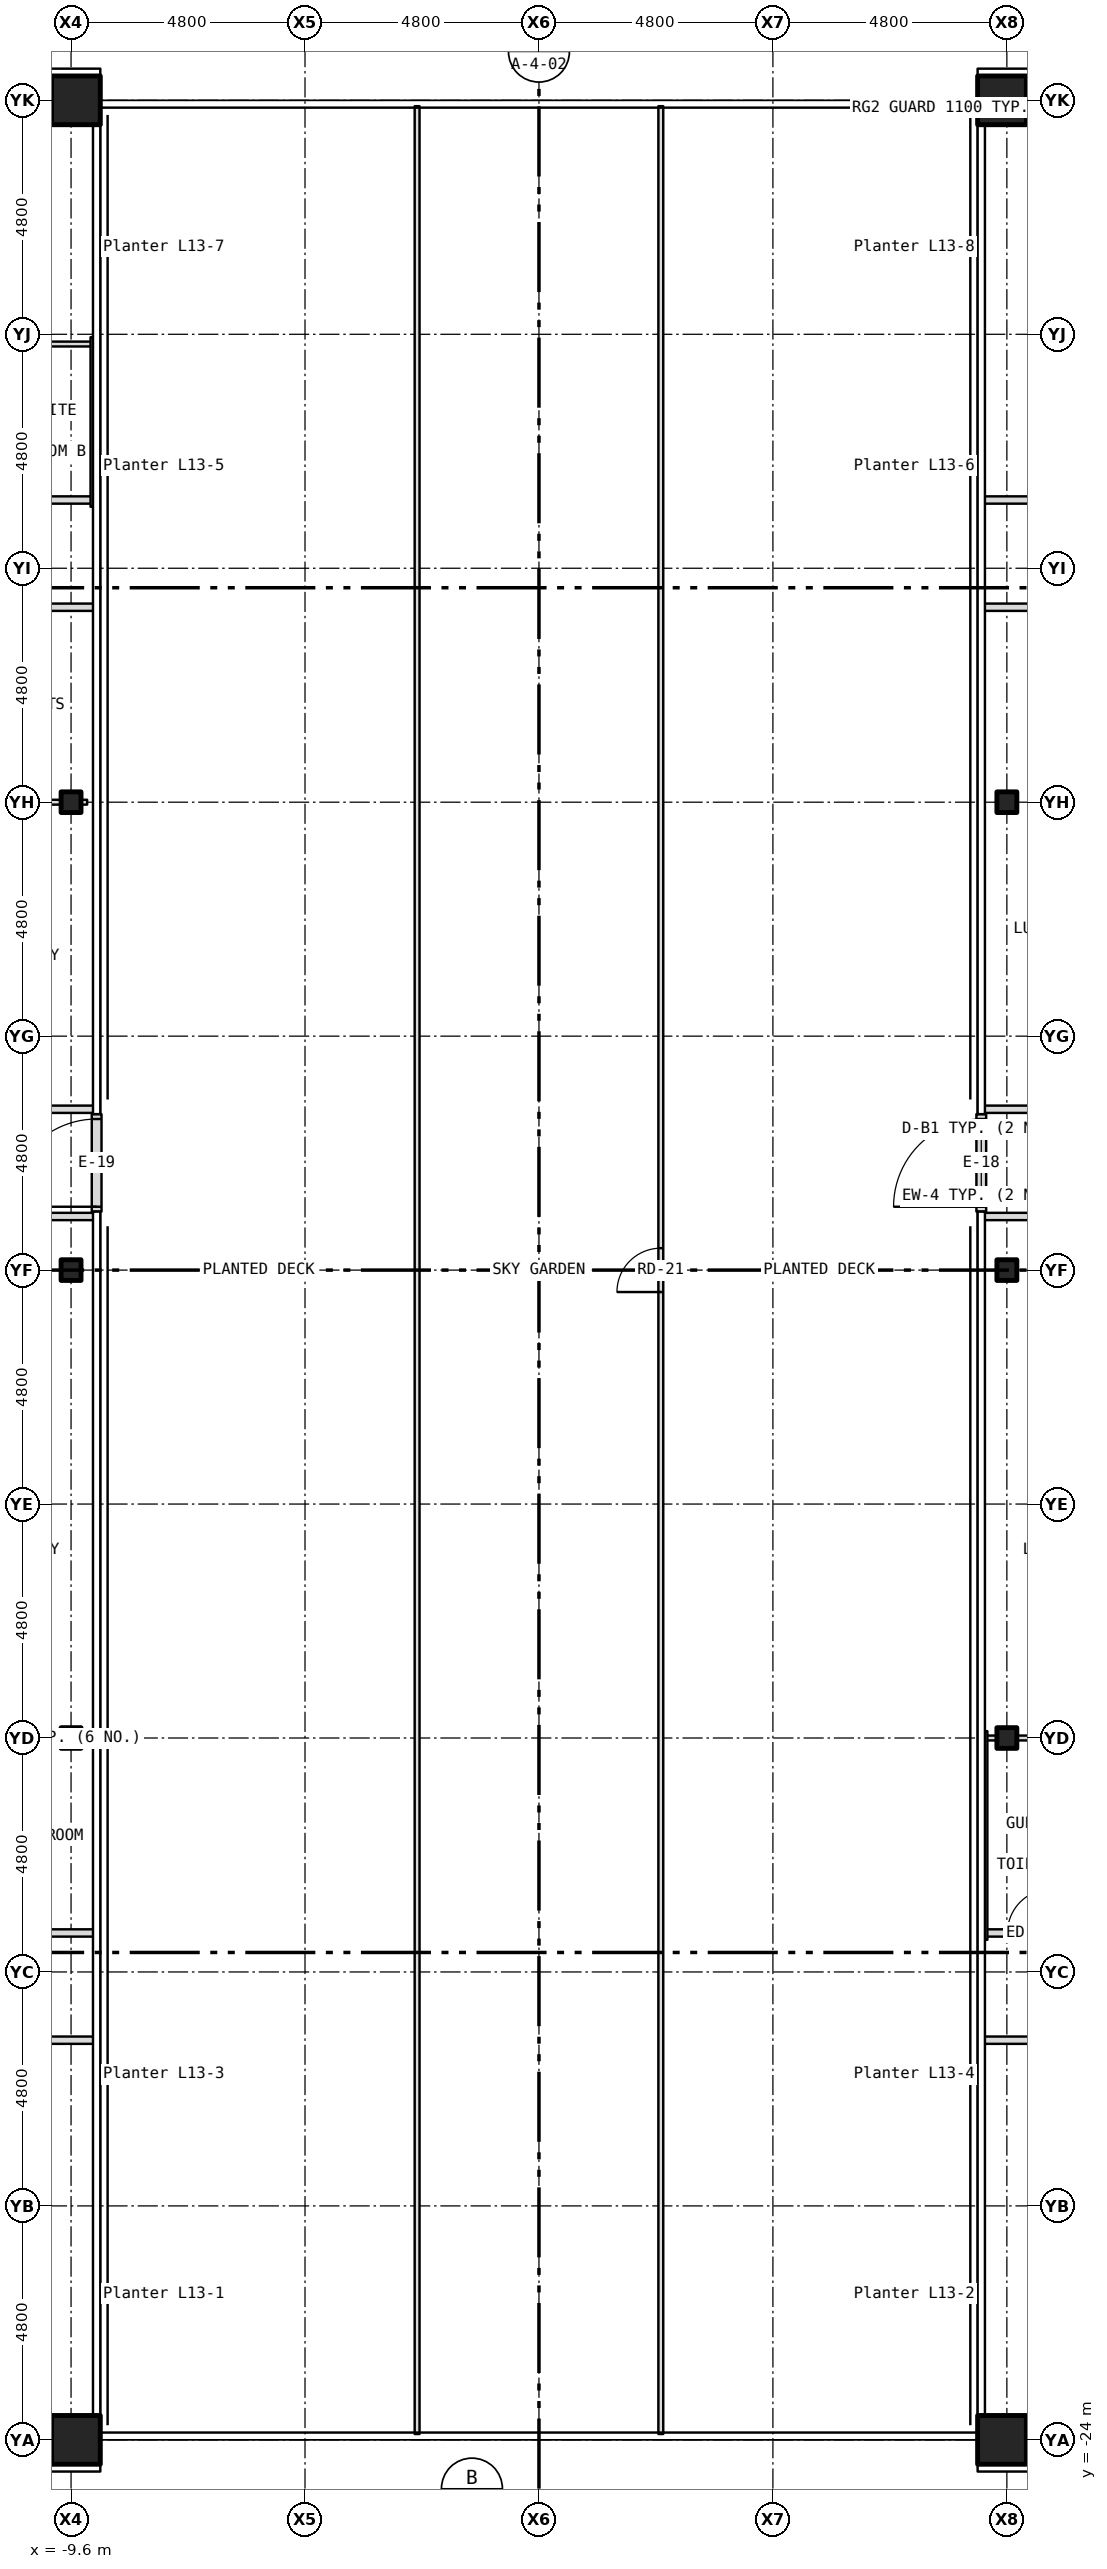
"""IFC4 building model, lengths in metres.
Left out: names, types, materials, properties, quantities, classifications, styles, units other than length and angle.
Written with IfcOpenShell. Run it as: python <this file> out.ifc"""

import sys

from ifc_helpers import new_model, si_unit, direction, frame, frame_2d, origin, origin_2d, place, context, subcontext, project, spatial, rectangle, hollow_rectangle, i_section, extrude, element, fill, save


model = new_model("IFC4")
c1 = context("Model", 3, precision=1e-05, world=origin(), true_north=direction((0.0, 1.0)))
c2 = subcontext(c1, "Body", "Model", "MODEL_VIEW")
j1 = project(units=[si_unit("LENGTHUNIT", "METRE"), si_unit("PLANEANGLEUNIT", "RADIAN")], contexts=[c1])
p1 = place(None, origin())
s1 = spatial("IfcSite", under=j1, at=p1, CompositionType="ELEMENT")
p2 = place(p1, origin())
s2 = spatial("IfcBuilding", under=s1, at=p2, CompositionType="ELEMENT")
p3 = place(p2, frame((0.0, 0.0, 60.0)))
s3 = spatial("IfcBuildingStorey", under=s2, at=p3, CompositionType="ELEMENT", Elevation=60.0)
for number, where, z_axis, x_axis in (
    (1, (-9.5, 24.0, -0.15), (0.0, 0.0, 1.0), (1.0, 0.0, 0.0)),
    (2, (-9.5, -24.0, -0.15), (0.0, 0.0, 1.0), (1.0, 0.0, 0.0)),
    (3, (9.5, 24.0, -0.15), (0.0, 0.0, 1.0), (1.0, 0.0, 0.0)),
    (4, (9.5, -24.0, -0.15), (0.0, 0.0, 1.0), (1.0, 0.0, 0.0)),
):
    element("IfcColumn", number, at=place(p3, frame(where, z_axis=z_axis, x_axis=x_axis)), inside=s3, PredefinedType="COLUMN", context=c2, shape_type="SweptSolid", body=[
        extrude(hollow_rectangle(XDim=1.0, YDim=1.0, WallThickness=0.06, at=origin_2d()), origin(), (0.0, 0.0, 1.0), 3.5),
    ])
for number, where, z_axis, x_axis in (
    (5, (-9.6, -9.6, -0.15), (0.0, 0.0, 1.0), (1.0, 0.0, 0.0)),
    (6, (-9.6, 0.0, -0.15), (0.0, 0.0, 1.0), (1.0, 0.0, 0.0)),
    (7, (-9.6, 9.6, -0.15), (0.0, 0.0, 1.0), (1.0, 0.0, 0.0)),
    (8, (9.6, -9.6, -0.15), (0.0, 0.0, 1.0), (1.0, 0.0, 0.0)),
    (9, (9.6, 0.0, -0.15), (0.0, 0.0, 1.0), (1.0, 0.0, 0.0)),
    (10, (9.6, 9.6, -0.15), (0.0, 0.0, 1.0), (1.0, 0.0, 0.0)),
):
    element("IfcColumn", number, at=place(p3, frame(where, z_axis=z_axis, x_axis=x_axis)), inside=s3, PredefinedType="COLUMN", context=c2, shape_type="SweptSolid", body=[
        extrude(i_section(OverallWidth=0.409, OverallDepth=0.424, WebThickness=0.033, FlangeThickness=0.052, at=origin_2d()), origin(), (0.0, 0.0, 1.0), 3.5),
    ])
p4 = place(p3, frame((9.075, 1.2, 0.0), z_axis=(0.0, 0.0, 1.0), x_axis=(0.0, 1.0, 0.0)))
e11 = element("IfcWall", 11, at=p4, inside=s3, PredefinedType="SOLIDWALL", context=c2, shape_type="SweptSolid", body=[
    extrude(rectangle(XDim=2.0, YDim=0.2, at=frame_2d((1.0, 0.0))), origin(), (0.0, 0.0, 1.0), 2.593),
])
p5 = place(p4, frame((0.1, 0.0, 0.0)))
e12 = element("IfcOpeningElement", 12, at=p5, cuts=e11, PredefinedType="OPENING", context=c2, shape_type="SweptSolid", body=[
    extrude(rectangle(XDim=1.8, YDim=2.1, at=frame_2d((0.9, 1.05))), frame((0.0, 0.112, 0.0), z_axis=(0.0, -1.0, 0.0), x_axis=(1.0, 0.0, 0.0)), (0.0, 0.0, 1.0), 0.224),
])
p6 = place(p3, frame((-9.075, 1.2, 0.0), z_axis=(0.0, 0.0, 1.0), x_axis=(0.0, 1.0, 0.0)))
e13 = element("IfcWall", 13, at=p6, inside=s3, PredefinedType="SOLIDWALL", context=c2, shape_type="SweptSolid", body=[
    extrude(rectangle(XDim=2.0, YDim=0.2, at=frame_2d((1.0, 0.0))), origin(), (0.0, 0.0, 1.0), 2.593),
])
p7 = place(p6, frame((0.1, 0.0, 0.0)))
e14 = element("IfcOpeningElement", 14, at=p7, cuts=e13, PredefinedType="OPENING", context=c2, shape_type="SweptSolid", body=[
    extrude(rectangle(XDim=1.8, YDim=2.1, at=frame_2d((0.9, 1.05))), frame((0.0, 0.112, 0.0), z_axis=(0.0, -1.0, 0.0), x_axis=(1.0, 0.0, 0.0)), (0.0, 0.0, 1.0), 0.224),
])
p8 = place(p3, frame((-15.8, -15.8, 0.0), z_axis=(0.0, 0.0, 1.0), x_axis=(1.0, 0.0, 0.0)))
e15 = element("IfcWall", 15, at=p8, inside=s3, PredefinedType="PARTITIONING", context=c2, shape_type="SweptSolid", body=[
    extrude(rectangle(XDim=6.68, YDim=0.15, at=frame_2d((3.34, 0.0))), origin(), (0.0, 0.0, 1.0), 3.35),
])
p9 = place(p8, frame((4.047, 0.0, 0.0)))
e16 = element("IfcOpeningElement", 16, at=p9, cuts=e15, PredefinedType="OPENING", context=c2, shape_type="SweptSolid", body=[
    extrude(rectangle(XDim=1.0, YDim=2.1, at=frame_2d((0.5, 1.05))), frame((0.0, 0.087, 0.0), z_axis=(0.0, -1.0, 0.0), x_axis=(1.0, 0.0, 0.0)), (0.0, 0.0, 1.0), 0.174),
])
p10 = place(p3, frame((9.12, -15.8, 0.0), z_axis=(0.0, 0.0, 1.0), x_axis=(1.0, 0.0, 0.0)))
e17 = element("IfcWall", 17, at=p10, inside=s3, PredefinedType="PARTITIONING", context=c2, shape_type="SweptSolid", body=[
    extrude(rectangle(XDim=6.68, YDim=0.15, at=frame_2d((3.34, 0.0))), origin(), (0.0, 0.0, 1.0), 3.35),
])
p11 = place(p10, frame((1.633, 0.0, 0.0)))
e18 = element("IfcOpeningElement", 18, at=p11, cuts=e17, PredefinedType="OPENING", context=c2, shape_type="SweptSolid", body=[
    extrude(rectangle(XDim=1.0, YDim=2.1, at=frame_2d((0.5, 1.05))), frame((0.0, 0.087, 0.0), z_axis=(0.0, -1.0, 0.0), x_axis=(1.0, 0.0, 0.0)), (0.0, 0.0, 1.0), 0.174),
])
p12 = place(p3, frame((-12.8, -13.6, 0.0), z_axis=(0.0, 0.0, 1.0), x_axis=(1.0, 0.0, 0.0)))
e19 = element("IfcWall", 19, at=p12, inside=s3, PredefinedType="PARTITIONING", context=c2, shape_type="SweptSolid", body=[
    extrude(rectangle(XDim=3.68, YDim=0.15, at=frame_2d((1.84, 0.0))), origin(), (0.0, 0.0, 1.0), 3.35),
])
p13 = place(p12, frame((1.375, 0.0, 0.0)))
e20 = element("IfcOpeningElement", 20, at=p13, cuts=e19, PredefinedType="OPENING", context=c2, shape_type="SweptSolid", body=[
    extrude(rectangle(XDim=0.9, YDim=2.1, at=frame_2d((0.45, 1.05))), frame((0.0, 0.087, 0.0), z_axis=(0.0, -1.0, 0.0), x_axis=(1.0, 0.0, 0.0)), (0.0, 0.0, 1.0), 0.174),
])
p14 = place(p3, frame((9.15, -13.6, 0.0), z_axis=(0.0, 0.0, 1.0), x_axis=(1.0, 0.0, 0.0)))
e21 = element("IfcWall", 21, at=p14, inside=s3, PredefinedType="PARTITIONING", context=c2, shape_type="SweptSolid", body=[
    extrude(rectangle(XDim=3.65, YDim=0.15, at=frame_2d((1.825, 0.0))), origin(), (0.0, 0.0, 1.0), 3.35),
])
p15 = place(p14, frame((0.462, 0.0, 0.0)))
e22 = element("IfcOpeningElement", 22, at=p15, cuts=e21, PredefinedType="OPENING", context=c2, shape_type="SweptSolid", body=[
    extrude(rectangle(XDim=0.9, YDim=2.1, at=frame_2d((0.45, 1.05))), frame((0.0, 0.087, 0.0), z_axis=(0.0, -1.0, 0.0), x_axis=(1.0, 0.0, 0.0)), (0.0, 0.0, 1.0), 0.174),
])
p16 = place(p3, frame((-12.8, -9.6, 0.0), z_axis=(0.0, 0.0, 1.0), x_axis=(1.0, 0.0, 0.0)))
e23 = element("IfcWall", 23, at=p16, inside=s3, PredefinedType="PARTITIONING", context=c2, shape_type="SweptSolid", body=[
    extrude(rectangle(XDim=2.996, YDim=0.1, at=frame_2d((1.498, 0.0))), origin(), (0.0, 0.0, 1.0), 2.728),
])
p17 = place(p3, frame((-9.804, -9.6, 0.0), z_axis=(0.0, 0.0, 1.0), x_axis=(1.0, 0.0, 0.0)))
e24 = element("IfcWall", 24, at=p17, inside=s3, PredefinedType="PARTITIONING", context=c2, shape_type="SweptSolid", body=[
    extrude(rectangle(XDim=0.534, YDim=0.1, at=frame_2d((0.267, 0.0))), origin(), (0.0, 0.0, 1.0), 3.35),
])
p18 = place(p3, frame((9.15, -9.6, 0.0), z_axis=(0.0, 0.0, 1.0), x_axis=(1.0, 0.0, 0.0)))
e25 = element("IfcWall", 25, at=p18, inside=s3, PredefinedType="PARTITIONING", context=c2, shape_type="SweptSolid", body=[
    extrude(rectangle(XDim=0.654, YDim=0.1, at=frame_2d((0.327, 0.0))), origin(), (0.0, 0.0, 1.0), 3.35),
])
p19 = place(p3, frame((9.804, -9.6, 0.0), z_axis=(0.0, 0.0, 1.0), x_axis=(1.0, 0.0, 0.0)))
e26 = element("IfcWall", 26, at=p19, inside=s3, PredefinedType="PARTITIONING", context=c2, shape_type="SweptSolid", body=[
    extrude(rectangle(XDim=2.996, YDim=0.1, at=frame_2d((1.498, 0.0))), origin(), (0.0, 0.0, 1.0), 2.728),
])
for number, where, z_axis, x_axis in (
    (27, (-12.4, 1.1, 0.0), (0.0, 0.0, 1.0), (1.0, 0.0, 0.0)),
    (28, (9.12, 1.1, 0.0), (0.0, 0.0, 1.0), (1.0, 0.0, 0.0)),
):
    element("IfcWall", number, at=place(p3, frame(where, z_axis=z_axis, x_axis=x_axis)), inside=s3, PredefinedType="PARTITIONING", context=c2, shape_type="SweptSolid", body=[
        extrude(rectangle(XDim=3.28, YDim=0.15, at=frame_2d((1.64, 0.0))), origin(), (0.0, 0.0, 1.0), 3.35),
    ])
for number, where, z_axis, x_axis in (
    (29, (-12.8, 3.3, 0.0), (0.0, 0.0, 1.0), (1.0, 0.0, 0.0)),
    (30, (9.12, 3.3, 0.0), (0.0, 0.0, 1.0), (1.0, 0.0, 0.0)),
):
    element("IfcWall", number, at=place(p3, frame(where, z_axis=z_axis, x_axis=x_axis)), inside=s3, PredefinedType="PARTITIONING", context=c2, shape_type="SweptSolid", body=[
        extrude(rectangle(XDim=3.68, YDim=0.15, at=frame_2d((1.84, 0.0))), origin(), (0.0, 0.0, 1.0), 3.35),
    ])
p20 = place(p3, frame((-12.8, 9.6, 0.0), z_axis=(0.0, 0.0, 1.0), x_axis=(1.0, 0.0, 0.0)))
e31 = element("IfcWall", 31, at=p20, inside=s3, PredefinedType="PARTITIONING", context=c2, shape_type="SweptSolid", body=[
    extrude(rectangle(XDim=2.996, YDim=0.1, at=frame_2d((1.498, 0.0))), origin(), (0.0, 0.0, 1.0), 2.728),
])
p21 = place(p3, frame((-9.804, 9.6, 0.0), z_axis=(0.0, 0.0, 1.0), x_axis=(1.0, 0.0, 0.0)))
e32 = element("IfcWall", 32, at=p21, inside=s3, PredefinedType="PARTITIONING", context=c2, shape_type="SweptSolid", body=[
    extrude(rectangle(XDim=0.534, YDim=0.1, at=frame_2d((0.267, 0.0))), origin(), (0.0, 0.0, 1.0), 3.35),
])
p22 = place(p3, frame((-12.8, 13.6, 0.0), z_axis=(0.0, 0.0, 1.0), x_axis=(1.0, 0.0, 0.0)))
e33 = element("IfcWall", 33, at=p22, inside=s3, PredefinedType="PARTITIONING", context=c2, shape_type="SweptSolid", body=[
    extrude(rectangle(XDim=3.68, YDim=0.15, at=frame_2d((1.84, 0.0))), origin(), (0.0, 0.0, 1.0), 3.35),
])
p23 = place(p22, frame((1.375, 0.0, 0.0)))
e34 = element("IfcOpeningElement", 34, at=p23, cuts=e33, PredefinedType="OPENING", context=c2, shape_type="SweptSolid", body=[
    extrude(rectangle(XDim=0.9, YDim=2.1, at=frame_2d((0.45, 1.05))), frame((0.0, 0.087, 0.0), z_axis=(0.0, -1.0, 0.0), x_axis=(1.0, 0.0, 0.0)), (0.0, 0.0, 1.0), 0.174),
])
p24 = place(p3, frame((9.12, 13.6, 0.0), z_axis=(0.0, 0.0, 1.0), x_axis=(1.0, 0.0, 0.0)))
e35 = element("IfcWall", 35, at=p24, inside=s3, PredefinedType="PARTITIONING", context=c2, shape_type="SweptSolid", body=[
    extrude(rectangle(XDim=3.68, YDim=0.15, at=frame_2d((1.84, 0.0))), origin(), (0.0, 0.0, 1.0), 3.35),
])
p25 = place(p3, frame((-15.8, 15.8, 0.0), z_axis=(0.0, 0.0, 1.0), x_axis=(1.0, 0.0, 0.0)))
e36 = element("IfcWall", 36, at=p25, inside=s3, PredefinedType="PARTITIONING", context=c2, shape_type="SweptSolid", body=[
    extrude(rectangle(XDim=6.65, YDim=0.15, at=frame_2d((3.325, 0.0))), origin(), (0.0, 0.0, 1.0), 3.35),
])
p26 = place(p25, frame((1.847, 0.0, 0.0)))
e37 = element("IfcOpeningElement", 37, at=p26, cuts=e36, PredefinedType="OPENING", context=c2, shape_type="SweptSolid", body=[
    extrude(rectangle(XDim=1.0, YDim=2.1, at=frame_2d((0.5, 1.05))), frame((0.0, 0.087, 0.0), z_axis=(0.0, -1.0, 0.0), x_axis=(1.0, 0.0, 0.0)), (0.0, 0.0, 1.0), 0.174),
])
p27 = place(p3, frame((9.12, 15.8, 0.0), z_axis=(0.0, 0.0, 1.0), x_axis=(1.0, 0.0, 0.0)))
e38 = element("IfcWall", 38, at=p27, inside=s3, PredefinedType="PARTITIONING", context=c2, shape_type="SweptSolid", body=[
    extrude(rectangle(XDim=6.68, YDim=0.15, at=frame_2d((3.34, 0.0))), origin(), (0.0, 0.0, 1.0), 3.35),
])
p28 = place(p27, frame((1.633, 0.0, 0.0)))
e39 = element("IfcOpeningElement", 39, at=p28, cuts=e38, PredefinedType="OPENING", context=c2, shape_type="SweptSolid", body=[
    extrude(rectangle(XDim=1.0, YDim=2.1, at=frame_2d((0.5, 1.05))), frame((0.0, 0.087, 0.0), z_axis=(0.0, -1.0, 0.0), x_axis=(1.0, 0.0, 0.0)), (0.0, 0.0, 1.0), 0.174),
])
p29 = place(p3, frame((-11.35, 19.0, 0.0), z_axis=(0.0, 0.0, 1.0), x_axis=(1.0, 0.0, 0.0)))
e40 = element("IfcWall", 40, at=p29, inside=s3, PredefinedType="PARTITIONING", context=c2, shape_type="SweptSolid", body=[
    extrude(rectangle(XDim=2.2, YDim=0.1, at=frame_2d((1.1, 0.0))), origin(), (0.0, 0.0, 1.0), 3.35),
])
p30 = place(p3, frame((-9.15, 15.66, 0.0), z_axis=(0.0, 0.0, 1.0), x_axis=(0.0, 1.0, 0.0)))
e41 = element("IfcWall", 41, at=p30, inside=s3, PredefinedType="PARTITIONING", context=c2, shape_type="SweptSolid", body=[
    extrude(rectangle(XDim=3.48, YDim=0.1, at=frame_2d((1.74, 0.0))), origin(), (0.0, 0.0, 1.0), 2.733),
])
p31 = place(p3, frame((-2.5, -23.88, 0.0), z_axis=(0.0, 0.0, 1.0), x_axis=(0.0, 1.0, 0.0)))
e42 = element("IfcWall", 42, at=p31, inside=s3, PredefinedType="PARTITIONING", context=c2, shape_type="SweptSolid", body=[
    extrude(rectangle(XDim=47.76, YDim=0.1, at=frame_2d((23.88, 0.0))), origin(), (0.0, 0.0, 1.0), 3.35),
])
p32 = place(p3, frame((2.5, -23.88, 0.0), z_axis=(0.0, 0.0, 1.0), x_axis=(0.0, 1.0, 0.0)))
e43 = element("IfcWall", 43, at=p32, inside=s3, PredefinedType="PARTITIONING", context=c2, shape_type="SweptSolid", body=[
    extrude(rectangle(XDim=47.76, YDim=0.1, at=frame_2d((23.88, 0.0))), origin(), (0.0, 0.0, 1.0), 3.35),
])
p33 = place(p32, frame((23.43, 0.0, 0.0)))
e44 = element("IfcOpeningElement", 44, at=p33, cuts=e43, PredefinedType="OPENING", context=c2, shape_type="SweptSolid", body=[
    extrude(rectangle(XDim=0.9, YDim=2.1, at=frame_2d((0.45, 1.05))), frame((0.0, 0.062, 0.0), z_axis=(0.0, -1.0, 0.0), x_axis=(1.0, 0.0, 0.0)), (0.0, 0.0, 1.0), 0.124),
])
p34 = place(p3, frame((9.15, -13.74, 0.0), z_axis=(0.0, 0.0, 1.0), x_axis=(0.0, 1.0, 0.0)))
e45 = element("IfcWall", 45, at=p34, inside=s3, PredefinedType="PARTITIONING", context=c2, shape_type="SweptSolid", body=[
    extrude(rectangle(XDim=4.28, YDim=0.1, at=frame_2d((2.14, 0.0))), origin(), (0.0, 0.0, 1.0), 2.733),
])
p35 = place(p5, origin())
e46 = element("IfcDoor", 46, at=p35, inside=s3, OperationType="DOUBLE_DOOR_DOUBLE_SWING", PredefinedType="DOOR", context=c2, shape_type="SweptSolid", body=[
    extrude(rectangle(XDim=1.8, YDim=2.1, at=frame_2d((0.9, 1.05))), frame((0.0, 0.025, 0.0), z_axis=(0.0, -1.0, 0.0), x_axis=(1.0, 0.0, 0.0)), (0.0, 0.0, 1.0), 0.05),
])
fill(e12, e46)
p36 = place(p7, origin())
e47 = element("IfcDoor", 47, at=p36, inside=s3, OperationType="DOUBLE_DOOR_DOUBLE_SWING", PredefinedType="DOOR", context=c2, shape_type="SweptSolid", body=[
    extrude(rectangle(XDim=1.8, YDim=2.1, at=frame_2d((0.9, 1.05))), frame((0.0, 0.025, 0.0), z_axis=(0.0, -1.0, 0.0), x_axis=(1.0, 0.0, 0.0)), (0.0, 0.0, 1.0), 0.05),
])
fill(e14, e47)
p37 = place(p15, origin())
e48 = element("IfcDoor", 48, at=p37, inside=s3, OperationType="SINGLE_SWING_RIGHT", PredefinedType="DOOR", context=c2, shape_type="SweptSolid", body=[
    extrude(rectangle(XDim=0.9, YDim=2.1, at=frame_2d((0.45, 1.05))), frame((0.0, 0.025, 0.0), z_axis=(0.0, -1.0, 0.0), x_axis=(1.0, 0.0, 0.0)), (0.0, 0.0, 1.0), 0.05),
])
fill(e22, e48)
p38 = place(p33, origin())
e49 = element("IfcDoor", 49, at=p38, inside=s3, OperationType="SINGLE_SWING_LEFT", PredefinedType="DOOR", context=c2, shape_type="SweptSolid", body=[
    extrude(rectangle(XDim=0.9, YDim=2.1, at=frame_2d((0.45, 1.05))), frame((0.0, 0.025, 0.0), z_axis=(0.0, -1.0, 0.0), x_axis=(1.0, 0.0, 0.0)), (0.0, 0.0, 1.0), 0.05),
])
fill(e44, e49)
save(model, sys.argv[1])
